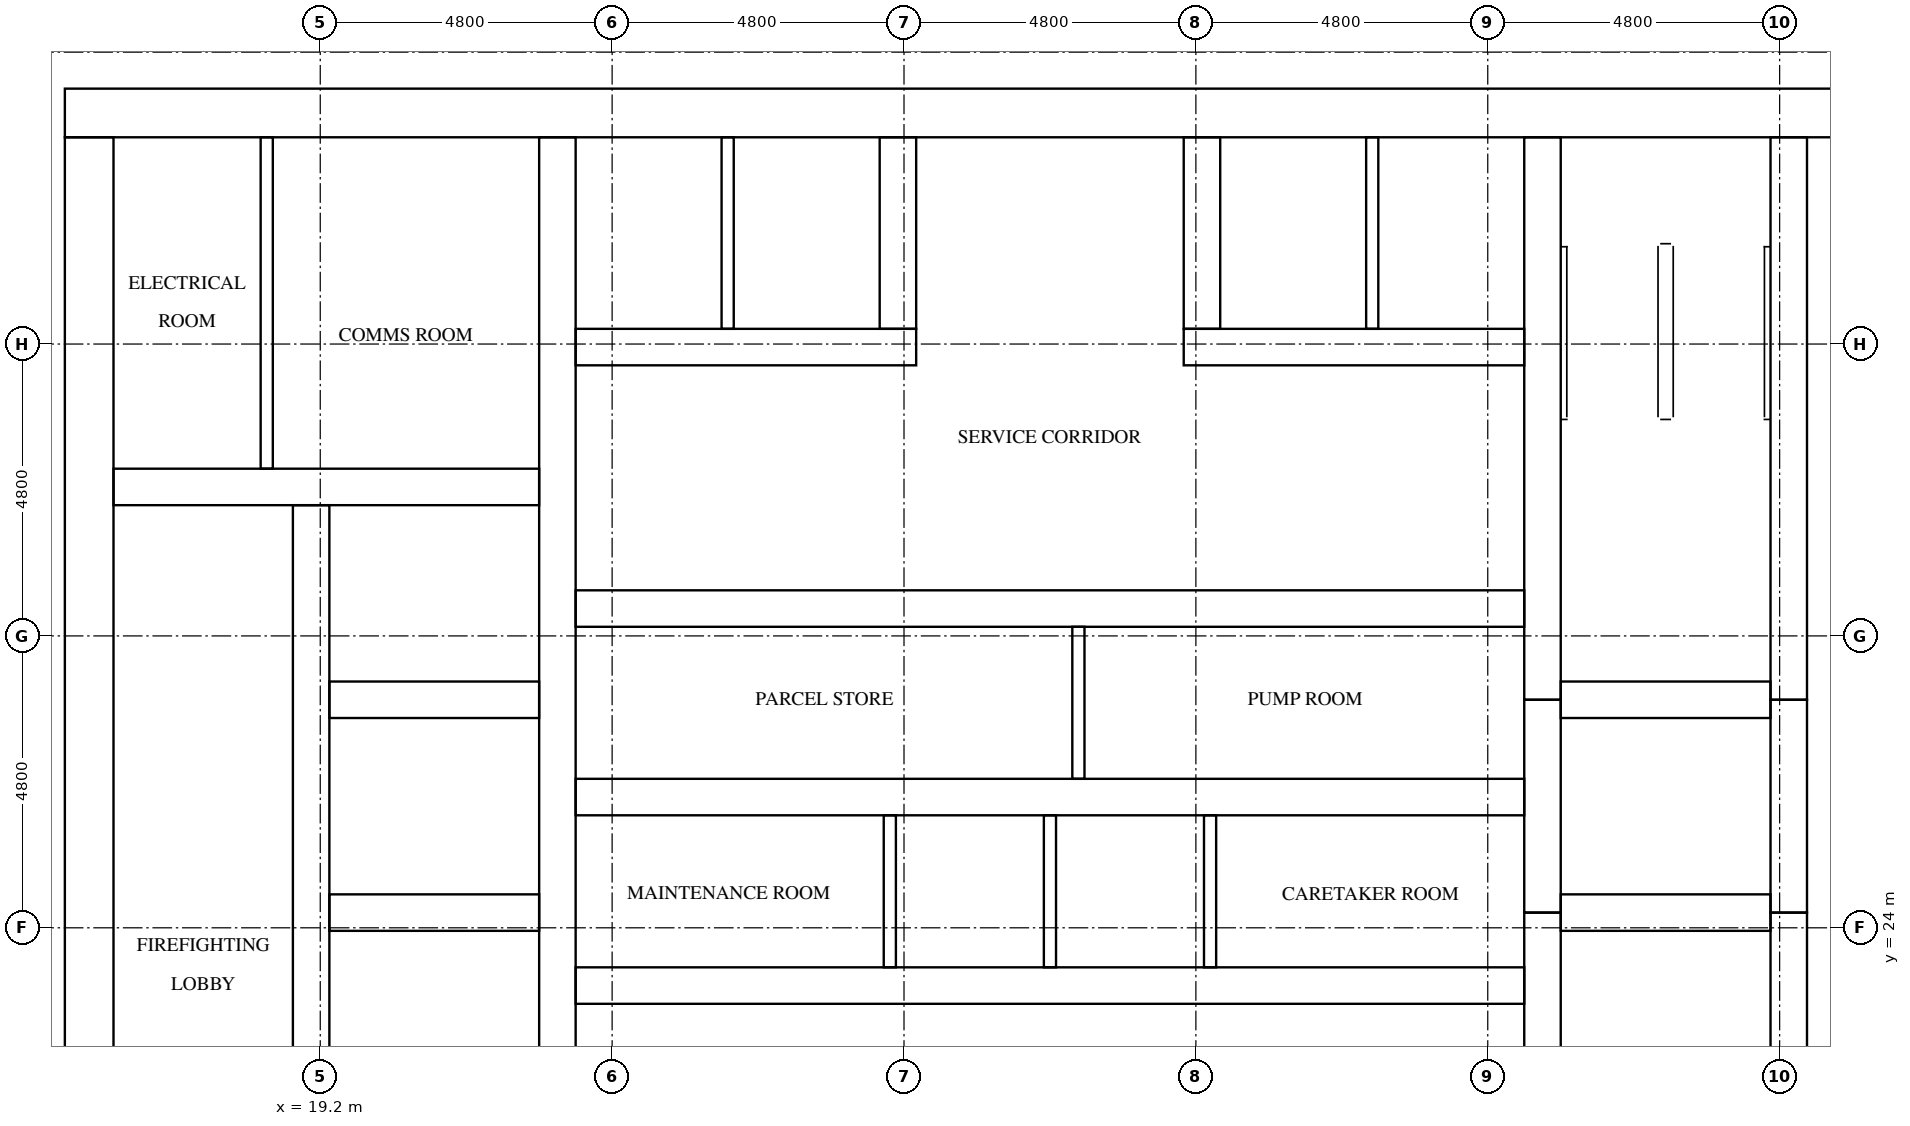
"""IFC4 building model, lengths in metres.
Left out: names, types, materials, properties, quantities, classifications, styles, units other than length and angle.
Written with IfcOpenShell. Run it as: python <this file> out.ifc"""

import sys

from ifc_helpers import new_model, si_unit, direction, frame, frame_2d, origin, place, context, subcontext, project, spatial, rectangle, extrude, element, fill, save


model = new_model("IFC4")
c1 = context("Model", 3, precision=1e-05, world=origin(), true_north=direction((0.0, 1.0)))
c2 = subcontext(c1, "Body", "Model", "MODEL_VIEW")
j1 = project(units=[si_unit("LENGTHUNIT", "METRE"), si_unit("PLANEANGLEUNIT", "RADIAN")], contexts=[c1])
p1 = place(None, origin())
s1 = spatial("IfcSite", under=j1, at=p1, CompositionType="ELEMENT")
p2 = place(p1, origin())
s2 = spatial("IfcBuilding", under=s1, at=p2, CompositionType="ELEMENT")
p3 = place(p2, frame((0.0, 0.0, 119.1)))
s3 = spatial("IfcBuildingStorey", under=s2, at=p3, CompositionType="ELEMENT", Elevation=119.1)
p4 = place(p3, frame((15.0, 37.4, 0.0), z_axis=(0.0, 0.0, 1.0), x_axis=(1.0, 0.0, 0.0)))
e1 = element("IfcWall", 1, at=p4, inside=s3, PredefinedType="SHEAR", context=c2, shape_type="SweptSolid", body=[
    extrude(rectangle(XDim=32.4, YDim=0.8, at=frame_2d((16.2, 0.0))), origin(), (0.0, 0.0, 1.0), 3.2),
])
p5 = place(p4, frame((15.3, 0.0, 0.0)))
e2 = element("IfcOpeningElement", 2, at=p5, cuts=e1, PredefinedType="OPENING", context=c2, shape_type="SweptSolid", body=[
    extrude(rectangle(XDim=1.8, YDim=2.1, at=frame_2d((0.9, 1.05))), frame((0.0, 0.41, 0.0), z_axis=(0.0, -1.0, 0.0), x_axis=(1.0, 0.0, 0.0)), (0.0, 0.0, 1.0), 0.82),
])
p6 = place(p4, frame((1.51, 0.0, 0.0)))
e3 = element("IfcOpeningElement", 3, at=p6, cuts=e1, PredefinedType="OPENING", context=c2, shape_type="SweptSolid", body=[
    extrude(rectangle(XDim=1.0, YDim=2.1, at=frame_2d((0.5, 1.05))), frame((0.0, 0.41, 0.0), z_axis=(0.0, -1.0, 0.0), x_axis=(1.0, 0.0, 0.0)), (0.0, 0.0, 1.0), 0.82),
])
p7 = place(p4, frame((5.11, 0.0, 0.0)))
e4 = element("IfcOpeningElement", 4, at=p7, cuts=e1, PredefinedType="OPENING", context=c2, shape_type="SweptSolid", body=[
    extrude(rectangle(XDim=1.0, YDim=2.1, at=frame_2d((0.5, 1.05))), frame((0.0, 0.41, 0.0), z_axis=(0.0, -1.0, 0.0), x_axis=(1.0, 0.0, 0.0)), (0.0, 0.0, 1.0), 0.82),
])
p8 = place(p3, frame((15.4, 15.8, 0.0), z_axis=(0.0, 0.0, 1.0), x_axis=(0.0, 1.0, 0.0)))
e5 = element("IfcWall", 5, at=p8, inside=s3, PredefinedType="SHEAR", context=c2, shape_type="SweptSolid", body=[
    extrude(rectangle(XDim=21.2, YDim=0.8, at=frame_2d((10.6, 0.0))), origin(), (0.0, 0.0, 1.0), 3.2),
])
p9 = place(p8, frame((4.96, 0.0, 0.0)))
e6 = element("IfcOpeningElement", 6, at=p9, cuts=e5, PredefinedType="OPENING", context=c2, shape_type="SweptSolid", body=[
    extrude(rectangle(XDim=1.2, YDim=2.1, at=frame_2d((0.6, 1.05))), frame((0.0, 0.41, 0.0), z_axis=(0.0, -1.0, 0.0), x_axis=(1.0, 0.0, 0.0)), (0.0, 0.0, 1.0), 0.82),
])
p10 = place(p3, frame((19.05, 15.8, 0.0), z_axis=(0.0, 0.0, 1.0), x_axis=(0.0, 1.0, 0.0)))
e7 = element("IfcWall", 7, at=p10, inside=s3, PredefinedType="SHEAR", context=c2, shape_type="SweptSolid", body=[
    extrude(rectangle(XDim=15.15, YDim=0.6, at=frame_2d((7.575, 0.0))), origin(), (0.0, 0.0, 1.0), 3.2),
])
p11 = place(p10, frame((9.65, 0.0, 0.0)))
e8 = element("IfcOpeningElement", 8, at=p11, cuts=e7, PredefinedType="OPENING", context=c2, shape_type="SweptSolid", body=[
    extrude(rectangle(XDim=1.1, YDim=2.1, at=frame_2d((0.55, 1.05))), frame((0.0, 0.31, 0.0), z_axis=(0.0, -1.0, 0.0), x_axis=(1.0, 0.0, 0.0)), (0.0, 0.0, 1.0), 0.62),
])
p12 = place(p10, frame((13.15, 0.0, 0.0)))
e9 = element("IfcOpeningElement", 9, at=p12, cuts=e7, PredefinedType="OPENING", context=c2, shape_type="SweptSolid", body=[
    extrude(rectangle(XDim=1.1, YDim=2.1, at=frame_2d((0.55, 1.05))), frame((0.0, 0.31, 0.0), z_axis=(0.0, -1.0, 0.0), x_axis=(1.0, 0.0, 0.0)), (0.0, 0.0, 1.0), 0.62),
])
p13 = place(p10, frame((0.4, 0.0, 0.0)))
e10 = element("IfcOpeningElement", 10, at=p13, cuts=e7, PredefinedType="OPENING", context=c2, shape_type="SweptSolid", body=[
    extrude(rectangle(XDim=1.2, YDim=2.1, at=frame_2d((0.6, 1.05))), frame((0.0, 0.31, 0.0), z_axis=(0.0, -1.0, 0.0), x_axis=(1.0, 0.0, 0.0)), (0.0, 0.0, 1.0), 0.62),
])
p14 = place(p3, frame((23.1, 15.8, 0.0), z_axis=(0.0, 0.0, 1.0), x_axis=(0.0, 1.0, 0.0)))
e11 = element("IfcWall", 11, at=p14, inside=s3, PredefinedType="SHEAR", context=c2, shape_type="SweptSolid", body=[
    extrude(rectangle(XDim=21.2, YDim=0.6, at=frame_2d((10.6, 0.0))), origin(), (0.0, 0.0, 1.0), 3.2),
])
p15 = place(p3, frame((39.3, 15.8, 0.0), z_axis=(0.0, 0.0, 1.0), x_axis=(0.0, 1.0, 0.0)))
e12 = element("IfcWall", 12, at=p15, inside=s3, PredefinedType="SHEAR", context=c2, shape_type="SweptSolid", body=[
    extrude(rectangle(XDim=8.45, YDim=0.6, at=frame_2d((4.225, 0.0))), origin(), (0.0, 0.0, 1.0), 3.2),
])
p16 = place(p3, frame((39.3, 24.25, 0.0), z_axis=(0.0, 0.0, 1.0), x_axis=(0.0, 1.0, 0.0)))
e13 = element("IfcWall", 13, at=p16, inside=s3, PredefinedType="SHEAR", context=c2, shape_type="SweptSolid", body=[
    extrude(rectangle(XDim=3.5, YDim=0.6, at=frame_2d((1.75, 0.0))), origin(), (0.0, 0.0, 1.0), 3.2),
])
p17 = place(p3, frame((39.3, 27.75, 0.0), z_axis=(0.0, 0.0, 1.0), x_axis=(0.0, 1.0, 0.0)))
e14 = element("IfcWall", 14, at=p17, inside=s3, PredefinedType="SHEAR", context=c2, shape_type="SweptSolid", body=[
    extrude(rectangle(XDim=9.25, YDim=0.6, at=frame_2d((4.625, 0.0))), origin(), (0.0, 0.0, 1.0), 3.2),
])
p18 = place(p3, frame((43.35, 15.8, 0.0), z_axis=(0.0, 0.0, 1.0), x_axis=(0.0, 1.0, 0.0)))
e15 = element("IfcWall", 15, at=p18, inside=s3, PredefinedType="SHEAR", context=c2, shape_type="SweptSolid", body=[
    extrude(rectangle(XDim=8.45, YDim=0.6, at=frame_2d((4.225, 0.0))), origin(), (0.0, 0.0, 1.0), 3.2),
])
p19 = place(p18, frame((0.4, 0.0, 0.0)))
e16 = element("IfcOpeningElement", 16, at=p19, cuts=e15, PredefinedType="OPENING", context=c2, shape_type="SweptSolid", body=[
    extrude(rectangle(XDim=1.2, YDim=2.1, at=frame_2d((0.6, 1.05))), frame((0.0, 0.31, 0.0), z_axis=(0.0, -1.0, 0.0), x_axis=(1.0, 0.0, 0.0)), (0.0, 0.0, 1.0), 0.62),
])
p20 = place(p3, frame((43.35, 24.25, 0.0), z_axis=(0.0, 0.0, 1.0), x_axis=(0.0, 1.0, 0.0)))
e17 = element("IfcWall", 17, at=p20, inside=s3, PredefinedType="SHEAR", context=c2, shape_type="SweptSolid", body=[
    extrude(rectangle(XDim=3.5, YDim=0.6, at=frame_2d((1.75, 0.0))), origin(), (0.0, 0.0, 1.0), 3.2),
])
p21 = place(p20, frame((1.2, 0.0, 0.0)))
e18 = element("IfcOpeningElement", 18, at=p21, cuts=e17, PredefinedType="OPENING", context=c2, shape_type="SweptSolid", body=[
    extrude(rectangle(XDim=1.1, YDim=2.1, at=frame_2d((0.55, 1.05))), frame((0.0, 0.31, 0.0), z_axis=(0.0, -1.0, 0.0), x_axis=(1.0, 0.0, 0.0)), (0.0, 0.0, 1.0), 0.62),
])
p22 = place(p3, frame((43.35, 27.75, 0.0), z_axis=(0.0, 0.0, 1.0), x_axis=(0.0, 1.0, 0.0)))
e19 = element("IfcWall", 19, at=p22, inside=s3, PredefinedType="SHEAR", context=c2, shape_type="SweptSolid", body=[
    extrude(rectangle(XDim=9.25, YDim=0.6, at=frame_2d((4.625, 0.0))), origin(), (0.0, 0.0, 1.0), 3.2),
])
p23 = place(p22, frame((7.65, 0.0, 0.0)))
e20 = element("IfcOpeningElement", 20, at=p23, cuts=e19, PredefinedType="OPENING", context=c2, shape_type="SweptSolid", body=[
    extrude(rectangle(XDim=1.2, YDim=2.1, at=frame_2d((0.6, 1.05))), frame((0.0, 0.31, 0.0), z_axis=(0.0, -1.0, 0.0), x_axis=(1.0, 0.0, 0.0)), (0.0, 0.0, 1.0), 0.62),
])
for number, where, z_axis, x_axis in (
    (21, (19.35, 24.25, 0.0), (0.0, 0.0, 1.0), (1.0, 0.0, 0.0)),
    (22, (19.35, 27.75, 0.0), (0.0, 0.0, 1.0), (1.0, 0.0, 0.0)),
):
    element("IfcWall", number, at=place(p3, frame(where, z_axis=z_axis, x_axis=x_axis)), inside=s3, PredefinedType="SHEAR", context=c2, shape_type="SweptSolid", body=[
        extrude(rectangle(XDim=3.45, YDim=0.6, at=frame_2d((1.725, 0.0))), origin(), (0.0, 0.0, 1.0), 3.2),
    ])
p24 = place(p3, frame((15.8, 31.25, 0.0), z_axis=(0.0, 0.0, 1.0), x_axis=(1.0, 0.0, 0.0)))
e23 = element("IfcWall", 23, at=p24, inside=s3, PredefinedType="SHEAR", context=c2, shape_type="SweptSolid", body=[
    extrude(rectangle(XDim=7.0, YDim=0.6, at=frame_2d((3.5, 0.0))), origin(), (0.0, 0.0, 1.0), 3.2),
])
for number, where, z_axis, x_axis in (
    (24, (39.6, 24.25, 0.0), (0.0, 0.0, 1.0), (1.0, 0.0, 0.0)),
    (25, (39.6, 27.75, 0.0), (0.0, 0.0, 1.0), (1.0, 0.0, 0.0)),
):
    element("IfcWall", number, at=place(p3, frame(where, z_axis=z_axis, x_axis=x_axis)), inside=s3, PredefinedType="SHEAR", context=c2, shape_type="SweptSolid", body=[
        extrude(rectangle(XDim=3.45, YDim=0.6, at=frame_2d((1.725, 0.0))), origin(), (0.0, 0.0, 1.0), 3.2),
    ])
p25 = place(p3, frame((23.4, 23.05, 0.0), z_axis=(0.0, 0.0, 1.0), x_axis=(1.0, 0.0, 0.0)))
e26 = element("IfcWall", 26, at=p25, inside=s3, PredefinedType="SHEAR", context=c2, shape_type="SweptSolid", body=[
    extrude(rectangle(XDim=15.6, YDim=0.6, at=frame_2d((7.8, 0.0))), origin(), (0.0, 0.0, 1.0), 3.2),
])
p26 = place(p25, frame((2.033, 0.0, 0.0)))
e27 = element("IfcOpeningElement", 27, at=p26, cuts=e26, PredefinedType="OPENING", context=c2, shape_type="SweptSolid", body=[
    extrude(rectangle(XDim=1.0, YDim=2.1, at=frame_2d((0.5, 1.05))), frame((0.0, 0.31, 0.0), z_axis=(0.0, -1.0, 0.0), x_axis=(1.0, 0.0, 0.0)), (0.0, 0.0, 1.0), 0.62),
])
p27 = place(p25, frame((12.567, 0.0, 0.0)))
e28 = element("IfcOpeningElement", 28, at=p27, cuts=e26, PredefinedType="OPENING", context=c2, shape_type="SweptSolid", body=[
    extrude(rectangle(XDim=1.0, YDim=2.1, at=frame_2d((0.5, 1.05))), frame((0.0, 0.31, 0.0), z_axis=(0.0, -1.0, 0.0), x_axis=(1.0, 0.0, 0.0)), (0.0, 0.0, 1.0), 0.62),
])
p28 = place(p3, frame((23.4, 26.15, 0.0), z_axis=(0.0, 0.0, 1.0), x_axis=(1.0, 0.0, 0.0)))
e29 = element("IfcWall", 29, at=p28, inside=s3, PredefinedType="SHEAR", context=c2, shape_type="SweptSolid", body=[
    extrude(rectangle(XDim=15.6, YDim=0.6, at=frame_2d((7.8, 0.0))), origin(), (0.0, 0.0, 1.0), 3.2),
])
p29 = place(p3, frame((23.4, 29.25, 0.0), z_axis=(0.0, 0.0, 1.0), x_axis=(1.0, 0.0, 0.0)))
e30 = element("IfcWall", 30, at=p29, inside=s3, PredefinedType="SHEAR", context=c2, shape_type="SweptSolid", body=[
    extrude(rectangle(XDim=15.6, YDim=0.6, at=frame_2d((7.8, 0.0))), origin(), (0.0, 0.0, 1.0), 3.2),
])
p30 = place(p29, frame((3.584, 0.0, 0.0)))
e31 = element("IfcOpeningElement", 31, at=p30, cuts=e30, PredefinedType="OPENING", context=c2, shape_type="SweptSolid", body=[
    extrude(rectangle(XDim=1.0, YDim=2.1, at=frame_2d((0.5, 1.05))), frame((0.0, 0.31, 0.0), z_axis=(0.0, -1.0, 0.0), x_axis=(1.0, 0.0, 0.0)), (0.0, 0.0, 1.0), 0.62),
])
p31 = place(p29, frame((11.484, 0.0, 0.0)))
e32 = element("IfcOpeningElement", 32, at=p31, cuts=e30, PredefinedType="OPENING", context=c2, shape_type="SweptSolid", body=[
    extrude(rectangle(XDim=1.0, YDim=2.1, at=frame_2d((0.5, 1.05))), frame((0.0, 0.31, 0.0), z_axis=(0.0, -1.0, 0.0), x_axis=(1.0, 0.0, 0.0)), (0.0, 0.0, 1.0), 0.62),
])
for number, where, z_axis, x_axis in (
    (33, (23.4, 33.55, 0.0), (0.0, 0.0, 1.0), (1.0, 0.0, 0.0)),
    (34, (33.4, 33.55, 0.0), (0.0, 0.0, 1.0), (1.0, 0.0, 0.0)),
):
    element("IfcWall", number, at=place(p3, frame(where, z_axis=z_axis, x_axis=x_axis)), inside=s3, PredefinedType="SHEAR", context=c2, shape_type="SweptSolid", body=[
        extrude(rectangle(XDim=5.6, YDim=0.6, at=frame_2d((2.8, 0.0))), origin(), (0.0, 0.0, 1.0), 3.2),
    ])
for number, where, z_axis, x_axis in (
    (35, (28.7, 33.85, 0.0), (0.0, 0.0, 1.0), (0.0, 1.0, 0.0)),
    (36, (33.7, 33.85, 0.0), (0.0, 0.0, 1.0), (0.0, 1.0, 0.0)),
):
    element("IfcWall", number, at=place(p3, frame(where, z_axis=z_axis, x_axis=x_axis)), inside=s3, PredefinedType="SHEAR", context=c2, shape_type="SweptSolid", body=[
        extrude(rectangle(XDim=3.15, YDim=0.6, at=frame_2d((1.575, 0.0))), origin(), (0.0, 0.0, 1.0), 3.2),
    ])
for number, where, z_axis, x_axis in (
    (37, (28.567, 23.35, 0.0), (0.0, 0.0, 1.0), (0.0, 1.0, 0.0)),
    (38, (31.2, 23.35, 0.0), (0.0, 0.0, 1.0), (0.0, 1.0, 0.0)),
    (39, (33.833, 23.35, 0.0), (0.0, 0.0, 1.0), (0.0, 1.0, 0.0)),
):
    element("IfcWall", number, at=place(p3, frame(where, z_axis=z_axis, x_axis=x_axis)), inside=s3, PredefinedType="SOLIDWALL", context=c2, shape_type="SweptSolid", body=[
        extrude(rectangle(XDim=2.5, YDim=0.2, at=frame_2d((1.25, 0.0))), origin(), (0.0, 0.0, 1.0), 3.2),
    ])
for number, where, z_axis, x_axis in (
    (40, (25.9, 33.85, 0.0), (0.0, 0.0, 1.0), (0.0, 1.0, 0.0)),
    (41, (36.5, 33.85, 0.0), (0.0, 0.0, 1.0), (0.0, 1.0, 0.0)),
):
    element("IfcWall", number, at=place(p3, frame(where, z_axis=z_axis, x_axis=x_axis)), inside=s3, PredefinedType="SOLIDWALL", context=c2, shape_type="SweptSolid", body=[
        extrude(rectangle(XDim=3.15, YDim=0.2, at=frame_2d((1.575, 0.0))), origin(), (0.0, 0.0, 1.0), 3.2),
    ])
p32 = place(p3, frame((18.32, 31.55, 0.0), z_axis=(0.0, 0.0, 1.0), x_axis=(0.0, 1.0, 0.0)))
e42 = element("IfcWall", 42, at=p32, inside=s3, PredefinedType="PARTITIONING", context=c2, shape_type="SweptSolid", body=[
    extrude(rectangle(XDim=5.45, YDim=0.2, at=frame_2d((2.725, 0.0))), origin(), (0.0, 0.0, 1.0), 3.2),
])
p33 = place(p3, frame((31.668, 26.45, 0.0), z_axis=(0.0, 0.0, 1.0), x_axis=(0.0, 1.0, 0.0)))
e43 = element("IfcWall", 43, at=p33, inside=s3, PredefinedType="PARTITIONING", context=c2, shape_type="SweptSolid", body=[
    extrude(rectangle(XDim=2.5, YDim=0.2, at=frame_2d((1.25, 0.0))), origin(), (0.0, 0.0, 1.0), 3.2),
])
p34 = place(p11, origin())
e44 = element("IfcDoor", 44, at=p34, inside=s3, OperationType="DOUBLE_DOOR_SLIDING", PredefinedType="DOOR", context=c2, shape_type="SweptSolid", body=[
    extrude(rectangle(XDim=1.1, YDim=2.1, at=frame_2d((0.55, 1.05))), frame((0.0, 0.025, 0.0), z_axis=(0.0, -1.0, 0.0), x_axis=(1.0, 0.0, 0.0)), (0.0, 0.0, 1.0), 0.05),
])
fill(e8, e44)
p35 = place(p12, origin())
e45 = element("IfcDoor", 45, at=p35, inside=s3, OperationType="DOUBLE_DOOR_SLIDING", PredefinedType="DOOR", context=c2, shape_type="SweptSolid", body=[
    extrude(rectangle(XDim=1.1, YDim=2.1, at=frame_2d((0.55, 1.05))), frame((0.0, 0.025, 0.0), z_axis=(0.0, -1.0, 0.0), x_axis=(1.0, 0.0, 0.0)), (0.0, 0.0, 1.0), 0.05),
])
fill(e9, e45)
p36 = place(p21, origin())
e46 = element("IfcDoor", 46, at=p36, inside=s3, OperationType="DOUBLE_DOOR_SLIDING", PredefinedType="DOOR", context=c2, shape_type="SweptSolid", body=[
    extrude(rectangle(XDim=1.1, YDim=2.1, at=frame_2d((0.55, 1.05))), frame((0.0, 0.025, 0.0), z_axis=(0.0, -1.0, 0.0), x_axis=(1.0, 0.0, 0.0)), (0.0, 0.0, 1.0), 0.05),
])
fill(e18, e46)
p37 = place(p23, origin())
e47 = element("IfcDoor", 47, at=p37, inside=s3, OperationType="SINGLE_SWING_RIGHT", PredefinedType="DOOR", context=c2, shape_type="SweptSolid", body=[
    extrude(rectangle(XDim=1.2, YDim=2.1, at=frame_2d((0.6, 1.05))), frame((0.0, 0.025, 0.0), z_axis=(0.0, -1.0, 0.0), x_axis=(1.0, 0.0, 0.0)), (0.0, 0.0, 1.0), 0.05),
])
fill(e20, e47)
p38 = place(p5, origin())
e48 = element("IfcDoor", 48, at=p38, inside=s3, OperationType="DOUBLE_DOOR_SINGLE_SWING", PredefinedType="DOOR", context=c2, shape_type="SweptSolid", body=[
    extrude(rectangle(XDim=1.8, YDim=2.1, at=frame_2d((0.9, 1.05))), frame((0.0, 0.025, 0.0), z_axis=(0.0, -1.0, 0.0), x_axis=(1.0, 0.0, 0.0)), (0.0, 0.0, 1.0), 0.05),
])
fill(e2, e48)
p39 = place(p6, origin())
e49 = element("IfcDoor", 49, at=p39, inside=s3, OperationType="SINGLE_SWING_LEFT", PredefinedType="DOOR", context=c2, shape_type="SweptSolid", body=[
    extrude(rectangle(XDim=1.0, YDim=2.1, at=frame_2d((0.5, 1.05))), frame((0.0, 0.025, 0.0), z_axis=(0.0, -1.0, 0.0), x_axis=(1.0, 0.0, 0.0)), (0.0, 0.0, 1.0), 0.05),
])
fill(e3, e49)
p40 = place(p7, origin())
e50 = element("IfcDoor", 50, at=p40, inside=s3, OperationType="SINGLE_SWING_RIGHT", PredefinedType="DOOR", context=c2, shape_type="SweptSolid", body=[
    extrude(rectangle(XDim=1.0, YDim=2.1, at=frame_2d((0.5, 1.05))), frame((0.0, 0.025, 0.0), z_axis=(0.0, -1.0, 0.0), x_axis=(1.0, 0.0, 0.0)), (0.0, 0.0, 1.0), 0.05),
])
fill(e4, e50)
p41 = place(p26, frame((1.0, 0.0, 0.0), z_axis=(0.0, 0.0, 1.0), x_axis=(-1.0, 0.0, 0.0)))
e51 = element("IfcDoor", 51, at=p41, inside=s3, OperationType="SINGLE_SWING_LEFT", PredefinedType="DOOR", context=c2, shape_type="SweptSolid", body=[
    extrude(rectangle(XDim=1.0, YDim=2.1, at=frame_2d((0.5, 1.05))), frame((0.0, 0.025, 0.0), z_axis=(0.0, -1.0, 0.0), x_axis=(1.0, 0.0, 0.0)), (0.0, 0.0, 1.0), 0.05),
])
fill(e27, e51)
p42 = place(p27, frame((1.0, 0.0, 0.0), z_axis=(0.0, 0.0, 1.0), x_axis=(-1.0, 0.0, 0.0)))
e52 = element("IfcDoor", 52, at=p42, inside=s3, OperationType="SINGLE_SWING_RIGHT", PredefinedType="DOOR", context=c2, shape_type="SweptSolid", body=[
    extrude(rectangle(XDim=1.0, YDim=2.1, at=frame_2d((0.5, 1.05))), frame((0.0, 0.025, 0.0), z_axis=(0.0, -1.0, 0.0), x_axis=(1.0, 0.0, 0.0)), (0.0, 0.0, 1.0), 0.05),
])
fill(e28, e52)
p43 = place(p30, origin())
e53 = element("IfcDoor", 53, at=p43, inside=s3, OperationType="SINGLE_SWING_LEFT", PredefinedType="DOOR", context=c2, shape_type="SweptSolid", body=[
    extrude(rectangle(XDim=1.0, YDim=2.1, at=frame_2d((0.5, 1.05))), frame((0.0, 0.025, 0.0), z_axis=(0.0, -1.0, 0.0), x_axis=(1.0, 0.0, 0.0)), (0.0, 0.0, 1.0), 0.05),
])
fill(e31, e53)
p44 = place(p31, origin())
e54 = element("IfcDoor", 54, at=p44, inside=s3, OperationType="SINGLE_SWING_RIGHT", PredefinedType="DOOR", context=c2, shape_type="SweptSolid", body=[
    extrude(rectangle(XDim=1.0, YDim=2.1, at=frame_2d((0.5, 1.05))), frame((0.0, 0.025, 0.0), z_axis=(0.0, -1.0, 0.0), x_axis=(1.0, 0.0, 0.0)), (0.0, 0.0, 1.0), 0.05),
])
fill(e32, e54)
save(model, sys.argv[1])
